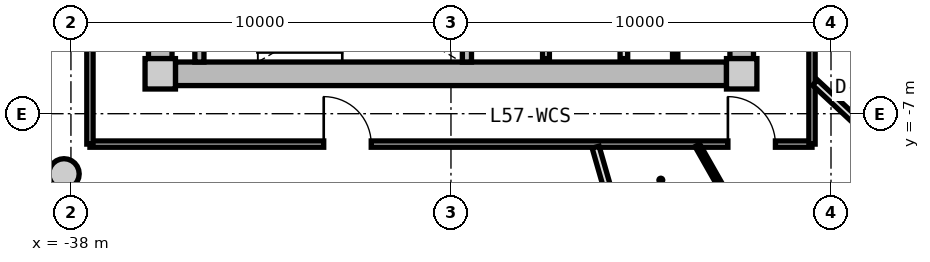
"""IFC4 building model, lengths in metres.
Left out: names, types, materials, properties, quantities, classifications, styles, units other than length and angle.
Written with IfcOpenShell. Run it as: python <this file> out.ifc"""

import sys

from ifc_helpers import new_model, si_unit, direction, frame, frame_2d, origin, origin_2d, place, context, subcontext, project, spatial, rectangle, circle, extrude, source, transform, mapped, element, fill, save


model = new_model("IFC4")
c1 = context("Model", 3, precision=1e-05, world=origin(), true_north=direction((0.0, 1.0)))
c2 = subcontext(c1, "Body", "Model", "MODEL_VIEW")
j1 = project(units=[si_unit("LENGTHUNIT", "METRE"), si_unit("PLANEANGLEUNIT", "RADIAN")], contexts=[c1])
p1 = place(None, origin())
s1 = spatial("IfcSite", under=j1, at=p1, CompositionType="ELEMENT")
p2 = place(p1, origin())
s2 = spatial("IfcBuilding", under=s1, at=p2, CompositionType="ELEMENT")
p3 = place(p2, frame((0.0, 0.0, 183.1)))
s3 = spatial("IfcBuildingStorey", under=s2, at=p3, CompositionType="ELEMENT", Elevation=183.1)
m1 = source(origin(), c2, "Body", "SweptSolid", [
    extrude(rectangle(XDim=0.8, YDim=0.8, at=origin_2d()), origin(), (0.0, 0.0, 1.0), 3.05),
])
for number, where, z_axis, x_axis in (
    (1, (-35.65, -5.95, 0.0), (0.0, 0.0, 1.0), (1.0, 0.0, 0.0)),
    (2, (-20.35, -5.95, 0.0), (0.0, 0.0, 1.0), (1.0, 0.0, 0.0)),
):
    element("IfcColumn", number, at=place(p3, frame(where, z_axis=z_axis, x_axis=x_axis)), inside=s3, PredefinedType="COLUMN", context=c2, shape_type="MappedRepresentation", body=[
        mapped(m1, transform((0.0, 0.0, 0.0), x_axis=(1.0, 0.0, 0.0), y_axis=(0.0, 1.0, 0.0), z_axis=(0.0, 0.0, 1.0), scale=1.0)),
    ])
m2 = source(origin(), c2, "Body", "SweptSolid", [
    extrude(rectangle(XDim=14.5, YDim=0.62, at=frame_2d((7.25, 0.0))), origin(), (0.0, 0.0, 1.0), 2.73),
])
p4 = place(p3, frame((-20.75, -5.95, 0.0), z_axis=(0.0, 0.0, 1.0), x_axis=(-1.0, 0.0, 0.0)))
e3 = element("IfcWall", 3, at=p4, inside=s3, PredefinedType="SHEAR", context=c2, shape_type="MappedRepresentation", body=[
    mapped(m2, transform((0.0, 0.0, 0.0), x_axis=(1.0, 0.0, 0.0), y_axis=(0.0, 1.0, 0.0), z_axis=(0.0, 0.0, 1.0), scale=1.0)),
])
m3 = source(origin(), c2, "Body", "SweptSolid", [
    extrude(rectangle(XDim=11.1, YDim=0.62, at=frame_2d((5.55, 0.0))), origin(), (0.0, 0.0, 1.0), 2.73),
])
p5 = place(p3, frame((-35.65, -5.55, 0.0), z_axis=(0.0, 0.0, 1.0), x_axis=(0.0, 1.0, 0.0)))
e4 = element("IfcWall", 4, at=p5, inside=s3, PredefinedType="SHEAR", context=c2, shape_type="MappedRepresentation", body=[
    mapped(m3, transform((0.0, 0.0, 0.0), x_axis=(1.0, 0.0, 0.0), y_axis=(0.0, 1.0, 0.0), z_axis=(0.0, 0.0, 1.0), scale=1.0)),
])
p6 = place(p5, frame((3.8, 0.0, 0.0)))
e5 = element("IfcOpeningElement", 5, at=p6, cuts=e4, PredefinedType="OPENING", context=c2, shape_type="SweptSolid", body=[
    extrude(rectangle(XDim=1.2, YDim=2.15, at=frame_2d((0.6, 1.075))), frame((0.0, 0.32, 0.0), z_axis=(0.0, -1.0, 0.0), x_axis=(1.0, 0.0, 0.0)), (0.0, 0.0, 1.0), 0.64),
])
p7 = place(p3, frame((-20.35, 5.55, 0.0), z_axis=(0.0, 0.0, 1.0), x_axis=(0.0, -1.0, 0.0)))
e6 = element("IfcWall", 6, at=p7, inside=s3, PredefinedType="SHEAR", context=c2, shape_type="MappedRepresentation", body=[
    mapped(m3, transform((0.0, 0.0, 0.0), x_axis=(1.0, 0.0, 0.0), y_axis=(0.0, 1.0, 0.0), z_axis=(0.0, 0.0, 1.0), scale=1.0)),
])
p8 = place(p7, frame((5.65, 0.0, 0.0)))
e7 = element("IfcOpeningElement", 7, at=p8, cuts=e6, PredefinedType="OPENING", context=c2, shape_type="SweptSolid", body=[
    extrude(rectangle(XDim=1.2, YDim=2.15, at=frame_2d((0.6, 1.075))), frame((0.0, 0.32, 0.0), z_axis=(0.0, -1.0, 0.0), x_axis=(1.0, 0.0, 0.0)), (0.0, 0.0, 1.0), 0.64),
])
m4 = source(origin(), c2, "Body", "SweptSolid", [
    extrude(circle(Radius=0.4, at=origin_2d()), origin(), (0.0, 0.0, 1.0), 3.05),
])
p9 = place(p3, frame((-38.183, -8.584, 0.0), z_axis=(0.0, 0.0, 1.0), x_axis=(1.0, 0.0, 0.0)))
e8 = element("IfcColumn", 8, at=p9, inside=s3, PredefinedType="COLUMN", context=c2, shape_type="MappedRepresentation", body=[
    mapped(m4, transform((0.0, 0.0, 0.0), x_axis=(1.0, 0.0, 0.0), y_axis=(0.0, 1.0, 0.0), z_axis=(0.0, 0.0, 1.0), scale=1.0)),
])
m5 = source(origin(), c2, "Body", "SweptSolid", [
    extrude(rectangle(XDim=3.19, YDim=0.24, at=frame_2d((1.595, 0.0))), origin(), (0.0, 0.0, 1.0), 2.73),
])
for number, where, z_axis, x_axis in (
    (9, (-34.62, -5.64, 0.0), (0.0, 0.0, 1.0), (0.0, 1.0, 0.0)),
    (10, (-27.58, -5.64, 0.0), (0.0, 0.0, 1.0), (0.0, 1.0, 0.0)),
):
    element("IfcWall", number, at=place(p3, frame(where, z_axis=z_axis, x_axis=x_axis)), inside=s3, PredefinedType="PARTITIONING", context=c2, shape_type="MappedRepresentation", body=[
        mapped(m5, transform((0.0, 0.0, 0.0), x_axis=(1.0, 0.0, 0.0), y_axis=(0.0, 1.0, 0.0), z_axis=(0.0, 0.0, 1.0), scale=1.0)),
    ])
m6 = source(origin(), c2, "Body", "SweptSolid", [
    extrude(rectangle(XDim=3.8, YDim=0.2, at=frame_2d((1.9, 0.0))), origin(), (0.0, 0.0, 1.0), 2.715),
])
p10 = place(p3, frame((-23.45, -5.55, 0.0), z_axis=(0.0, 0.0, 1.0), x_axis=(0.0, 1.0, 0.0)))
e11 = element("IfcWall", 11, at=p10, inside=s3, PredefinedType="PARTITIONING", context=c2, shape_type="MappedRepresentation", body=[
    mapped(m6, transform((0.0, 0.0, 0.0), x_axis=(1.0, 0.0, 0.0), y_axis=(0.0, 1.0, 0.0), z_axis=(0.0, 0.0, 1.0), scale=1.0)),
])
m7 = source(origin(), c2, "Body", "SweptSolid", [
    extrude(rectangle(XDim=4.2, YDim=0.18, at=frame_2d((2.1, 0.0))), origin(), (0.0, 0.0, 1.0), 2.715),
])
p11 = place(p3, frame((-25.5, -5.55, 0.0), z_axis=(0.0, 0.0, 1.0), x_axis=(0.0, 1.0, 0.0)))
e12 = element("IfcWall", 12, at=p11, inside=s3, PredefinedType="PARTITIONING", context=c2, shape_type="MappedRepresentation", body=[
    mapped(m7, transform((0.0, 0.0, 0.0), x_axis=(1.0, 0.0, 0.0), y_axis=(0.0, 1.0, 0.0), z_axis=(0.0, 0.0, 1.0), scale=1.0)),
])
m8 = source(origin(), c2, "Body", "SweptSolid", [
    extrude(rectangle(XDim=3.8, YDim=0.14, at=frame_2d((1.9, 0.0))), origin(), (0.0, 0.0, 1.0), 2.715),
])
p12 = place(p3, frame((-22.1, -5.55, 0.0), z_axis=(0.0, 0.0, 1.0), x_axis=(0.0, 1.0, 0.0)))
e13 = element("IfcWall", 13, at=p12, inside=s3, PredefinedType="PARTITIONING", context=c2, shape_type="MappedRepresentation", body=[
    mapped(m8, transform((0.0, 0.0, 0.0), x_axis=(1.0, 0.0, 0.0), y_axis=(0.0, 1.0, 0.0), z_axis=(0.0, 0.0, 1.0), scale=1.0)),
])
m9 = source(origin(), c2, "Body", "SweptSolid", [
    extrude(rectangle(XDim=19.0, YDim=0.165, at=frame_2d((9.5, 0.0))), origin(), (0.0, 0.0, 1.0), 2.715),
])
p13 = place(p3, frame((-18.5, -7.8, 0.0), z_axis=(0.0, 0.0, 1.0), x_axis=(-1.0, 0.0, 0.0)))
e14 = element("IfcWall", 14, at=p13, inside=s3, PredefinedType="PARTITIONING", context=c2, shape_type="MappedRepresentation", body=[
    mapped(m9, transform((0.0, 0.0, 0.0), x_axis=(1.0, 0.0, 0.0), y_axis=(0.0, 1.0, 0.0), z_axis=(0.0, 0.0, 1.0), scale=1.0)),
])
p14 = place(p13, frame((11.598, 0.0, 0.0)))
e15 = element("IfcOpeningElement", 15, at=p14, cuts=e14, PredefinedType="OPENING", context=c2, shape_type="SweptSolid", body=[
    extrude(rectangle(XDim=1.25, YDim=2.2, at=frame_2d((0.625, 1.1))), frame((0.0, 0.093, 0.0), z_axis=(0.0, -1.0, 0.0), x_axis=(1.0, 0.0, 0.0)), (0.0, 0.0, 1.0), 0.185),
])
p15 = place(p13, frame((0.963, 0.0, 0.0)))
e16 = element("IfcOpeningElement", 16, at=p15, cuts=e14, PredefinedType="OPENING", context=c2, shape_type="SweptSolid", body=[
    extrude(rectangle(XDim=1.25, YDim=2.2, at=frame_2d((0.625, 1.1))), frame((0.0, 0.093, 0.0), z_axis=(0.0, -1.0, 0.0), x_axis=(1.0, 0.0, 0.0)), (0.0, 0.0, 1.0), 0.185),
])
m10 = source(origin(), c2, "Body", "SweptSolid", [
    extrude(rectangle(XDim=6.88, YDim=0.165, at=frame_2d((3.44, 0.0))), origin(), (0.0, 0.0, 1.0), 2.715),
])
p16 = place(p3, frame((-37.5, -7.8, 0.0), z_axis=(0.0, 0.0, 1.0), x_axis=(0.0, 1.0, 0.0)))
e17 = element("IfcWall", 17, at=p16, inside=s3, PredefinedType="PARTITIONING", context=c2, shape_type="MappedRepresentation", body=[
    mapped(m10, transform((0.0, 0.0, 0.0), x_axis=(1.0, 0.0, 0.0), y_axis=(0.0, 1.0, 0.0), z_axis=(0.0, 0.0, 1.0), scale=1.0)),
])
m11 = source(origin(), c2, "Body", "SweptSolid", [
    extrude(rectangle(XDim=7.365, YDim=0.165, at=frame_2d((3.682, 0.0))), origin(), (0.0, 0.0, 1.0), 2.715),
])
p17 = place(p3, frame((-18.5, -0.436, 0.0), z_axis=(0.0, 0.0, 1.0), x_axis=(0.0, -1.0, 0.0)))
e18 = element("IfcWall", 18, at=p17, inside=s3, PredefinedType="PARTITIONING", context=c2, shape_type="MappedRepresentation", body=[
    mapped(m11, transform((0.0, 0.0, 0.0), x_axis=(1.0, 0.0, 0.0), y_axis=(0.0, 1.0, 0.0), z_axis=(0.0, 0.0, 1.0), scale=1.0)),
])
p18 = place(p17, frame((2.433, 0.0, 0.0)))
e19 = element("IfcOpeningElement", 19, at=p18, cuts=e18, PredefinedType="OPENING", context=c2, shape_type="SweptSolid", body=[
    extrude(rectangle(XDim=1.25, YDim=2.2, at=frame_2d((0.625, 1.1))), frame((0.0, 0.093, 0.0), z_axis=(0.0, -1.0, 0.0), x_axis=(1.0, 0.0, 0.0)), (0.0, 0.0, 1.0), 0.185),
])
m12 = source(origin(), c2, "Body", "SweptSolid", [
    extrude(rectangle(XDim=6.035, YDim=0.19, at=frame_2d((3.018, 0.0))), origin(), (0.0, 0.0, 1.0), 2.265),
])
p19 = place(p3, frame((-24.194, -7.88, 0.0), z_axis=(0.0, 0.0, 1.0), x_axis=(0.276809454862, -0.960924828329, 0.0)))
e20 = element("IfcWall", 20, at=p19, inside=s3, PredefinedType="PARTITIONING", context=c2, shape_type="MappedRepresentation", body=[
    mapped(m12, transform((0.0, 0.0, 0.0), x_axis=(1.0, 0.0, 0.0), y_axis=(0.0, 1.0, 0.0), z_axis=(0.0, 0.0, 1.0), scale=1.0)),
])
m13 = source(origin(), c2, "Body", "SweptSolid", [
    extrude(rectangle(XDim=4.927, YDim=0.19, at=frame_2d((2.463, 0.0))), origin(), (0.0, 0.0, 1.0), 2.265),
])
p20 = place(p3, frame((-18.42, -6.183, 0.0), z_axis=(0.0, 0.0, 1.0), x_axis=(0.732191335987, -0.681098999783, 0.0)))
e21 = element("IfcWall", 21, at=p20, inside=s3, PredefinedType="PARTITIONING", context=c2, shape_type="MappedRepresentation", body=[
    mapped(m13, transform((0.0, 0.0, 0.0), x_axis=(1.0, 0.0, 0.0), y_axis=(0.0, 1.0, 0.0), z_axis=(0.0, 0.0, 1.0), scale=1.0)),
])
m14 = source(origin(), c2, "Body", "SweptSolid", [
    extrude(rectangle(XDim=2.055, YDim=0.14, at=frame_2d((1.027, 0.0))), origin(), (0.0, 0.0, 1.0), 2.715),
])
p21 = place(p3, frame((-21.516, -7.83, 0.0), z_axis=(0.0, 0.0, 1.0), x_axis=(0.494154336367, -0.869374195528, 0.0)))
e22 = element("IfcWall", 22, at=p21, inside=s3, PredefinedType="PARTITIONING", context=c2, shape_type="MappedRepresentation", body=[
    mapped(m14, transform((0.0, 0.0, 0.0), x_axis=(1.0, 0.0, 0.0), y_axis=(0.0, 1.0, 0.0), z_axis=(0.0, 0.0, 1.0), scale=1.0)),
])
m15 = source(origin(), c2, "Body", "SweptSolid", [
    extrude(rectangle(XDim=1.25, YDim=2.2, at=frame_2d((0.625, 1.1))), frame((0.0, 0.025, 0.0), z_axis=(0.0, -1.0, 0.0), x_axis=(1.0, 0.0, 0.0)), (0.0, 0.0, 1.0), 0.05),
])
p22 = place(p14, frame((1.25, 0.0, 0.0), z_axis=(0.0, 0.0, 1.0), x_axis=(-1.0, 0.0, 0.0)))
e23 = element("IfcDoor", 23, at=p22, inside=s3, OperationType="SINGLE_SWING_LEFT", PredefinedType="DOOR", context=c2, shape_type="MappedRepresentation", body=[
    mapped(m15, transform((0.0, 0.0, 0.0), x_axis=(1.0, 0.0, 0.0), y_axis=(0.0, 1.0, 0.0), z_axis=(0.0, 0.0, 1.0), scale=1.0)),
])
fill(e15, e23)
p23 = place(p15, frame((1.25, 0.0, 0.0), z_axis=(0.0, 0.0, 1.0), x_axis=(-1.0, 0.0, 0.0)))
e24 = element("IfcDoor", 24, at=p23, inside=s3, OperationType="SINGLE_SWING_LEFT", PredefinedType="DOOR", context=c2, shape_type="MappedRepresentation", body=[
    mapped(m15, transform((0.0, 0.0, 0.0), x_axis=(1.0, 0.0, 0.0), y_axis=(0.0, 1.0, 0.0), z_axis=(0.0, 0.0, 1.0), scale=1.0)),
])
fill(e16, e24)
save(model, sys.argv[1])
